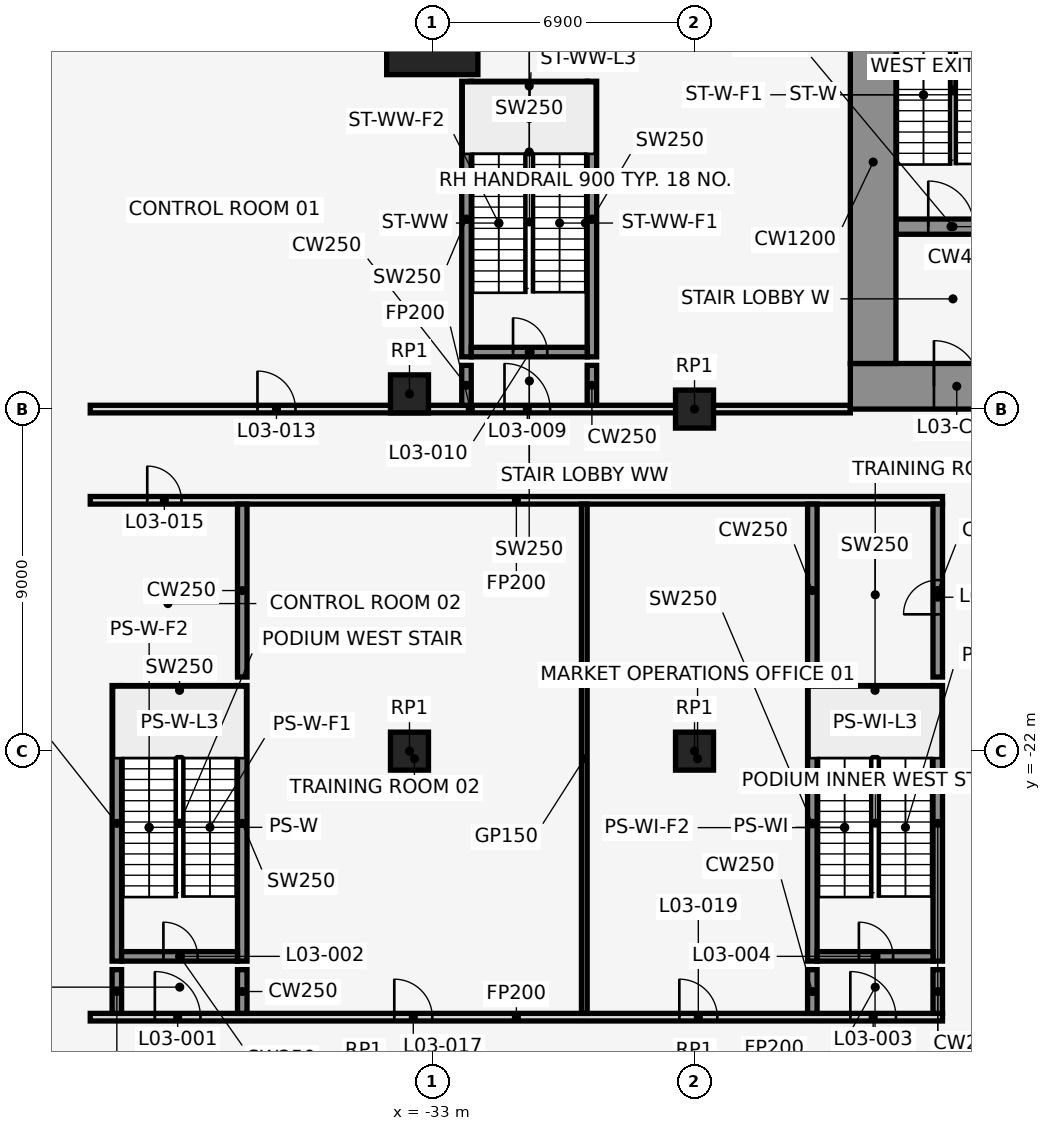
"""IFC4 building model, lengths in metres.
Left out: names, types, materials, properties, quantities, classifications, styles, units other than length and angle.
Written with IfcOpenShell. Run it as: python <this file> out.ifc"""

import sys

from ifc_helpers import new_model, si_unit, direction, frame, frame_2d, origin, origin_2d, place, context, subcontext, project, spatial, rectangle, extrude, element, fill, save


model = new_model("IFC4")
c1 = context("Model", 3, precision=1e-05, world=origin(), true_north=direction((0.0, 1.0)))
c2 = subcontext(c1, "Body", "Model", "MODEL_VIEW")
j1 = project(units=[si_unit("LENGTHUNIT", "METRE"), si_unit("PLANEANGLEUNIT", "RADIAN")], contexts=[c1])
p1 = place(None, origin())
s1 = spatial("IfcSite", under=j1, at=p1, CompositionType="ELEMENT")
p2 = place(p1, origin())
s2 = spatial("IfcBuilding", under=s1, at=p2, CompositionType="ELEMENT")
p3 = place(p2, frame((0.0, 0.0, 20.0)))
s3 = spatial("IfcBuildingStorey", under=s2, at=p3, CompositionType="ELEMENT", Elevation=20.0)
p4 = place(p3, frame((-33.0, -3.0, 0.0), z_axis=(0.0, 0.0, 1.0), x_axis=(1.0, 0.0, 0.0)))
e1 = element("IfcColumn", 1, at=p4, inside=s3, PredefinedType="COLUMN", context=c2, shape_type="SweptSolid", body=[
    extrude(rectangle(XDim=2.4, YDim=2.4, at=origin_2d()), origin(), (0.0, 0.0, 1.0), 5.0),
])
for number, where, z_axis, x_axis in (
    (2, (-33.6, -12.6, 0.0), (0.0, 0.0, 1.0), (1.0, 0.0, 0.0)),
    (3, (-33.6, -22.0, 0.0), (0.0, 0.0, 1.0), (1.0, 0.0, 0.0)),
    (4, (-26.1, -22.0, 0.0), (0.0, 0.0, 1.0), (1.0, 0.0, 0.0)),
    (5, (-26.1, -13.0, 0.0), (0.0, 0.0, 1.0), (1.0, 0.0, 0.0)),
):
    element("IfcColumn", number, at=place(p3, frame(where, z_axis=z_axis, x_axis=x_axis)), inside=s3, PredefinedType="COLUMN", context=c2, shape_type="SweptSolid", body=[
        extrude(rectangle(XDim=1.0, YDim=1.0, at=origin_2d()), origin(), (0.0, 0.0, 1.0), 5.0),
    ])
for number, where, z_axis, x_axis in (
    (6, (-32.1, -11.625, 0.0), (0.0, 0.0, 1.0), (0.0, 1.0, 0.0)),
    (7, (-28.8, -11.625, 0.0), (0.0, 0.0, 1.0), (0.0, 1.0, 0.0)),
):
    element("IfcWall", number, at=place(p3, frame(where, z_axis=z_axis, x_axis=x_axis)), inside=s3, PredefinedType="SHEAR", context=c2, shape_type="SweptSolid", body=[
        extrude(rectangle(XDim=7.25, YDim=0.25, at=frame_2d((3.625, 0.0))), origin(), (0.0, 0.0, 1.0), 5.0),
    ])
p5 = place(p3, frame((-31.975, -11.5, 0.0), z_axis=(0.0, 0.0, 1.0), x_axis=(1.0, 0.0, 0.0)))
e8 = element("IfcWall", 8, at=p5, inside=s3, PredefinedType="SHEAR", context=c2, shape_type="SweptSolid", body=[
    extrude(rectangle(XDim=3.05, YDim=0.25, at=frame_2d((1.525, 0.0))), origin(), (0.0, 0.0, 1.0), 5.0),
])
p6 = place(p5, frame((1.1, 0.0, 0.0)))
e9 = element("IfcOpeningElement", 9, at=p6, cuts=e8, PredefinedType="OPENING", context=c2, shape_type="SweptSolid", body=[
    extrude(rectangle(XDim=0.9, YDim=2.1, at=frame_2d((0.45, 1.05))), frame((0.0, 0.137, 0.0), z_axis=(0.0, -1.0, 0.0), x_axis=(1.0, 0.0, 0.0)), (0.0, 0.0, 1.0), 0.274),
])
p7 = place(p3, frame((-31.975, -4.5, 0.0), z_axis=(0.0, 0.0, 1.0), x_axis=(1.0, 0.0, 0.0)))
e10 = element("IfcWall", 10, at=p7, inside=s3, PredefinedType="SHEAR", context=c2, shape_type="SweptSolid", body=[
    extrude(rectangle(XDim=3.05, YDim=0.25, at=frame_2d((1.525, 0.0))), origin(), (0.0, 0.0, 1.0), 5.0),
])
for number, where, z_axis, x_axis in (
    (11, (-41.3, -27.525, 0.0), (0.0, 0.0, 1.0), (0.0, 1.0, 0.0)),
    (12, (-38.0, -27.525, 0.0), (0.0, 0.0, 1.0), (0.0, 1.0, 0.0)),
):
    element("IfcWall", number, at=place(p3, frame(where, z_axis=z_axis, x_axis=x_axis)), inside=s3, PredefinedType="SHEAR", context=c2, shape_type="SweptSolid", body=[
        extrude(rectangle(XDim=7.25, YDim=0.25, at=frame_2d((3.625, 0.0))), origin(), (0.0, 0.0, 1.0), 5.0),
    ])
p8 = place(p3, frame((-41.175, -27.4, 0.0), z_axis=(0.0, 0.0, 1.0), x_axis=(1.0, 0.0, 0.0)))
e13 = element("IfcWall", 13, at=p8, inside=s3, PredefinedType="SHEAR", context=c2, shape_type="SweptSolid", body=[
    extrude(rectangle(XDim=3.05, YDim=0.25, at=frame_2d((1.525, 0.0))), origin(), (0.0, 0.0, 1.0), 5.0),
])
p9 = place(p8, frame((1.1, 0.0, 0.0)))
e14 = element("IfcOpeningElement", 14, at=p9, cuts=e13, PredefinedType="OPENING", context=c2, shape_type="SweptSolid", body=[
    extrude(rectangle(XDim=0.9, YDim=2.1, at=frame_2d((0.45, 1.05))), frame((0.0, 0.137, 0.0), z_axis=(0.0, -1.0, 0.0), x_axis=(1.0, 0.0, 0.0)), (0.0, 0.0, 1.0), 0.274),
])
p10 = place(p3, frame((-41.175, -20.4, 0.0), z_axis=(0.0, 0.0, 1.0), x_axis=(1.0, 0.0, 0.0)))
e15 = element("IfcWall", 15, at=p10, inside=s3, PredefinedType="SHEAR", context=c2, shape_type="SweptSolid", body=[
    extrude(rectangle(XDim=3.05, YDim=0.25, at=frame_2d((1.525, 0.0))), origin(), (0.0, 0.0, 1.0), 5.0),
])
for number, where, z_axis, x_axis in (
    (16, (-23.0, -27.525, 0.0), (0.0, 0.0, 1.0), (0.0, 1.0, 0.0)),
    (17, (-19.7, -27.525, 0.0), (0.0, 0.0, 1.0), (0.0, 1.0, 0.0)),
):
    element("IfcWall", number, at=place(p3, frame(where, z_axis=z_axis, x_axis=x_axis)), inside=s3, PredefinedType="SHEAR", context=c2, shape_type="SweptSolid", body=[
        extrude(rectangle(XDim=7.25, YDim=0.25, at=frame_2d((3.625, 0.0))), origin(), (0.0, 0.0, 1.0), 5.0),
    ])
p11 = place(p3, frame((-22.875, -27.4, 0.0), z_axis=(0.0, 0.0, 1.0), x_axis=(1.0, 0.0, 0.0)))
e18 = element("IfcWall", 18, at=p11, inside=s3, PredefinedType="SHEAR", context=c2, shape_type="SweptSolid", body=[
    extrude(rectangle(XDim=3.05, YDim=0.25, at=frame_2d((1.525, 0.0))), origin(), (0.0, 0.0, 1.0), 5.0),
])
p12 = place(p11, frame((1.1, 0.0, 0.0)))
e19 = element("IfcOpeningElement", 19, at=p12, cuts=e18, PredefinedType="OPENING", context=c2, shape_type="SweptSolid", body=[
    extrude(rectangle(XDim=0.9, YDim=2.1, at=frame_2d((0.45, 1.05))), frame((0.0, 0.137, 0.0), z_axis=(0.0, -1.0, 0.0), x_axis=(1.0, 0.0, 0.0)), (0.0, 0.0, 1.0), 0.274),
])
p13 = place(p3, frame((-22.875, -20.4, 0.0), z_axis=(0.0, 0.0, 1.0), x_axis=(1.0, 0.0, 0.0)))
e20 = element("IfcWall", 20, at=p13, inside=s3, PredefinedType="SHEAR", context=c2, shape_type="SweptSolid", body=[
    extrude(rectangle(XDim=3.05, YDim=0.25, at=frame_2d((1.525, 0.0))), origin(), (0.0, 0.0, 1.0), 5.0),
])
p14 = place(p3, frame((-42.0, -29.0, 0.0), z_axis=(0.0, 0.0, 1.0), x_axis=(1.0, 0.0, 0.0)))
e21 = element("IfcWall", 21, at=p14, inside=s3, PredefinedType="PARTITIONING", context=c2, shape_type="SweptSolid", body=[
    extrude(rectangle(XDim=22.425, YDim=0.2, at=frame_2d((11.212, 0.0))), origin(), (0.0, 0.0, 1.0), 4.7),
])
p15 = place(p14, frame((1.7, 0.0, 0.0)))
e22 = element("IfcOpeningElement", 22, at=p15, cuts=e21, PredefinedType="OPENING", context=c2, shape_type="SweptSolid", body=[
    extrude(rectangle(XDim=1.2, YDim=2.1, at=frame_2d((0.6, 1.05))), frame((0.0, 0.112, 0.0), z_axis=(0.0, -1.0, 0.0), x_axis=(1.0, 0.0, 0.0)), (0.0, 0.0, 1.0), 0.224),
])
p16 = place(p14, frame((20.0, 0.0, 0.0)))
e23 = element("IfcOpeningElement", 23, at=p16, cuts=e21, PredefinedType="OPENING", context=c2, shape_type="SweptSolid", body=[
    extrude(rectangle(XDim=1.2, YDim=2.1, at=frame_2d((0.6, 1.05))), frame((0.0, 0.112, 0.0), z_axis=(0.0, -1.0, 0.0), x_axis=(1.0, 0.0, 0.0)), (0.0, 0.0, 1.0), 0.224),
])
p17 = place(p14, frame((8.0, 0.0, 0.0)))
e24 = element("IfcOpeningElement", 24, at=p17, cuts=e21, PredefinedType="OPENING", context=c2, shape_type="SweptSolid", body=[
    extrude(rectangle(XDim=1.0, YDim=2.1, at=frame_2d((0.5, 1.05))), frame((0.0, 0.112, 0.0), z_axis=(0.0, -1.0, 0.0), x_axis=(1.0, 0.0, 0.0)), (0.0, 0.0, 1.0), 0.224),
])
p18 = place(p14, frame((15.5, 0.0, 0.0)))
e25 = element("IfcOpeningElement", 25, at=p18, cuts=e21, PredefinedType="OPENING", context=c2, shape_type="SweptSolid", body=[
    extrude(rectangle(XDim=1.0, YDim=2.1, at=frame_2d((0.5, 1.05))), frame((0.0, 0.112, 0.0), z_axis=(0.0, -1.0, 0.0), x_axis=(1.0, 0.0, 0.0)), (0.0, 0.0, 1.0), 0.224),
])
p19 = place(p3, frame((-42.0, -15.4, 0.0), z_axis=(0.0, 0.0, 1.0), x_axis=(1.0, 0.0, 0.0)))
e26 = element("IfcWall", 26, at=p19, inside=s3, PredefinedType="PARTITIONING", context=c2, shape_type="SweptSolid", body=[
    extrude(rectangle(XDim=22.425, YDim=0.2, at=frame_2d((11.212, 0.0))), origin(), (0.0, 0.0, 1.0), 4.7),
])
p20 = place(p19, frame((1.5, 0.0, 0.0)))
e27 = element("IfcOpeningElement", 27, at=p20, cuts=e26, PredefinedType="OPENING", context=c2, shape_type="SweptSolid", body=[
    extrude(rectangle(XDim=0.9, YDim=2.1, at=frame_2d((0.45, 1.05))), frame((0.0, 0.112, 0.0), z_axis=(0.0, -1.0, 0.0), x_axis=(1.0, 0.0, 0.0)), (0.0, 0.0, 1.0), 0.224),
])
p21 = place(p3, frame((-42.0, -13.0, 0.0), z_axis=(0.0, 0.0, 1.0), x_axis=(1.0, 0.0, 0.0)))
e28 = element("IfcWall", 28, at=p21, inside=s3, PredefinedType="PARTITIONING", context=c2, shape_type="SweptSolid", body=[
    extrude(rectangle(XDim=20.0, YDim=0.2, at=frame_2d((10.0, 0.0))), origin(), (0.0, 0.0, 1.0), 4.7),
])
p22 = place(p21, frame((10.9, 0.0, 0.0)))
e29 = element("IfcOpeningElement", 29, at=p22, cuts=e28, PredefinedType="OPENING", context=c2, shape_type="SweptSolid", body=[
    extrude(rectangle(XDim=1.2, YDim=2.1, at=frame_2d((0.6, 1.05))), frame((0.0, 0.112, 0.0), z_axis=(0.0, -1.0, 0.0), x_axis=(1.0, 0.0, 0.0)), (0.0, 0.0, 1.0), 0.224),
])
p23 = place(p21, frame((4.4, 0.0, 0.0)))
e30 = element("IfcOpeningElement", 30, at=p23, cuts=e28, PredefinedType="OPENING", context=c2, shape_type="SweptSolid", body=[
    extrude(rectangle(XDim=1.0, YDim=2.1, at=frame_2d((0.5, 1.05))), frame((0.0, 0.112, 0.0), z_axis=(0.0, -1.0, 0.0), x_axis=(1.0, 0.0, 0.0)), (0.0, 0.0, 1.0), 0.224),
])
for number, where, z_axis, x_axis in (
    (31, (-41.3, -28.9, 0.0), (0.0, 0.0, 1.0), (0.0, 1.0, 0.0)),
    (32, (-38.0, -28.9, 0.0), (0.0, 0.0, 1.0), (0.0, 1.0, 0.0)),
):
    element("IfcWall", number, at=place(p3, frame(where, z_axis=z_axis, x_axis=x_axis)), inside=s3, PredefinedType="SHEAR", context=c2, shape_type="SweptSolid", body=[
        extrude(rectangle(XDim=1.15, YDim=0.25, at=frame_2d((0.575, 0.0))), origin(), (0.0, 0.0, 1.0), 5.0),
    ])
p24 = place(p3, frame((-38.0, -20.05, 0.0), z_axis=(0.0, 0.0, 1.0), x_axis=(0.0, 1.0, 0.0)))
e33 = element("IfcWall", 33, at=p24, inside=s3, PredefinedType="SHEAR", context=c2, shape_type="SweptSolid", body=[
    extrude(rectangle(XDim=4.55, YDim=0.25, at=frame_2d((2.275, 0.0))), origin(), (0.0, 0.0, 1.0), 5.0),
])
p25 = place(p3, frame((-32.1, -12.9, 0.0), z_axis=(0.0, 0.0, 1.0), x_axis=(0.0, 1.0, 0.0)))
e34 = element("IfcWall", 34, at=p25, inside=s3, PredefinedType="SHEAR", context=c2, shape_type="SweptSolid", body=[
    extrude(rectangle(XDim=1.05, YDim=0.25, at=frame_2d((0.525, 0.0))), origin(), (0.0, 0.0, 1.0), 5.0),
])
p26 = place(p3, frame((-29.0, -28.9, 0.0), z_axis=(0.0, 0.0, 1.0), x_axis=(0.0, 1.0, 0.0)))
e35 = element("IfcWall", 35, at=p26, inside=s3, PredefinedType="PARTITIONING", context=c2, shape_type="SweptSolid", body=[
    extrude(rectangle(XDim=13.4, YDim=0.15, at=frame_2d((6.7, 0.0))), origin(), (0.0, 0.0, 1.0), 4.7),
])
p27 = place(p3, frame((-28.8, -12.9, 0.0), z_axis=(0.0, 0.0, 1.0), x_axis=(0.0, 1.0, 0.0)))
e36 = element("IfcWall", 36, at=p27, inside=s3, PredefinedType="SHEAR", context=c2, shape_type="SweptSolid", body=[
    extrude(rectangle(XDim=1.05, YDim=0.25, at=frame_2d((0.525, 0.0))), origin(), (0.0, 0.0, 1.0), 5.0),
])
p28 = place(p3, frame((-23.0, -28.9, 0.0), z_axis=(0.0, 0.0, 1.0), x_axis=(0.0, 1.0, 0.0)))
e37 = element("IfcWall", 37, at=p28, inside=s3, PredefinedType="SHEAR", context=c2, shape_type="SweptSolid", body=[
    extrude(rectangle(XDim=1.15, YDim=0.25, at=frame_2d((0.575, 0.0))), origin(), (0.0, 0.0, 1.0), 5.0),
])
p29 = place(p3, frame((-23.0, -20.05, 0.0), z_axis=(0.0, 0.0, 1.0), x_axis=(0.0, 1.0, 0.0)))
e38 = element("IfcWall", 38, at=p29, inside=s3, PredefinedType="SHEAR", context=c2, shape_type="SweptSolid", body=[
    extrude(rectangle(XDim=4.55, YDim=0.25, at=frame_2d((2.275, 0.0))), origin(), (0.0, 0.0, 1.0), 5.0),
])
p30 = place(p3, frame((-19.7, -28.9, 0.0), z_axis=(0.0, 0.0, 1.0), x_axis=(0.0, 1.0, 0.0)))
e39 = element("IfcWall", 39, at=p30, inside=s3, PredefinedType="SHEAR", context=c2, shape_type="SweptSolid", body=[
    extrude(rectangle(XDim=1.15, YDim=0.25, at=frame_2d((0.575, 0.0))), origin(), (0.0, 0.0, 1.0), 5.0),
])
p31 = place(p3, frame((-19.7, -20.05, 0.0), z_axis=(0.0, 0.0, 1.0), x_axis=(0.0, 1.0, 0.0)))
e40 = element("IfcWall", 40, at=p31, inside=s3, PredefinedType="SHEAR", context=c2, shape_type="SweptSolid", body=[
    extrude(rectangle(XDim=4.55, YDim=0.25, at=frame_2d((2.275, 0.0))), origin(), (0.0, 0.0, 1.0), 5.0),
])
p32 = place(p31, frame((1.65, 0.0, 0.0)))
e41 = element("IfcOpeningElement", 41, at=p32, cuts=e40, PredefinedType="OPENING", context=c2, shape_type="SweptSolid", body=[
    extrude(rectangle(XDim=0.9, YDim=2.1, at=frame_2d((0.45, 1.05))), frame((0.0, 0.137, 0.0), z_axis=(0.0, -1.0, 0.0), x_axis=(1.0, 0.0, 0.0)), (0.0, 0.0, 1.0), 0.274),
])
p33 = place(p3, frame((-20.8, -8.2, 0.0), z_axis=(0.0, 0.0, 1.0), x_axis=(1.0, 0.0, 0.0)))
e42 = element("IfcWall", 42, at=p33, inside=s3, PredefinedType="SHEAR", context=c2, shape_type="SweptSolid", body=[
    extrude(rectangle(XDim=3.0, YDim=0.4, at=frame_2d((1.5, 0.0))), origin(), (0.0, 0.0, 1.0), 5.0),
])
p34 = place(p33, frame((0.85, 0.0, 0.0)))
e43 = element("IfcOpeningElement", 43, at=p34, cuts=e42, PredefinedType="OPENING", context=c2, shape_type="SweptSolid", body=[
    extrude(rectangle(XDim=1.2, YDim=2.1, at=frame_2d((0.6, 1.05))), frame((0.0, 0.212, 0.0), z_axis=(0.0, -1.0, 0.0), x_axis=(1.0, 0.0, 0.0)), (0.0, 0.0, 1.0), 0.424),
])
p35 = place(p3, frame((-22.0, -12.4, 0.0), z_axis=(0.0, 0.0, 1.0), x_axis=(1.0, 0.0, 0.0)))
e44 = element("IfcWall", 44, at=p35, inside=s3, PredefinedType="SHEAR", context=c2, shape_type="SweptSolid", body=[
    extrude(rectangle(XDim=44.0, YDim=1.2, at=frame_2d((22.0, 0.0))), origin(), (0.0, 0.0, 1.0), 5.0),
])
p36 = place(p35, frame((2.2, 0.0, 0.0)))
e45 = element("IfcOpeningElement", 45, at=p36, cuts=e44, PredefinedType="OPENING", context=c2, shape_type="SweptSolid", body=[
    extrude(rectangle(XDim=1.2, YDim=2.1, at=frame_2d((0.6, 1.05))), frame((0.0, 0.612, 0.0), z_axis=(0.0, -1.0, 0.0), x_axis=(1.0, 0.0, 0.0)), (0.0, 0.0, 1.0), 1.224),
])
p37 = place(p35, frame((21.4, 0.0, 0.0)))
e46 = element("IfcOpeningElement", 46, at=p37, cuts=e44, PredefinedType="OPENING", context=c2, shape_type="SweptSolid", body=[
    extrude(rectangle(XDim=1.2, YDim=2.1, at=frame_2d((0.6, 1.05))), frame((0.0, 0.612, 0.0), z_axis=(0.0, -1.0, 0.0), x_axis=(1.0, 0.0, 0.0)), (0.0, 0.0, 1.0), 1.224),
])
p38 = place(p35, frame((40.6, 0.0, 0.0)))
e47 = element("IfcOpeningElement", 47, at=p38, cuts=e44, PredefinedType="OPENING", context=c2, shape_type="SweptSolid", body=[
    extrude(rectangle(XDim=1.2, YDim=2.1, at=frame_2d((0.6, 1.05))), frame((0.0, 0.612, 0.0), z_axis=(0.0, -1.0, 0.0), x_axis=(1.0, 0.0, 0.0)), (0.0, 0.0, 1.0), 1.224),
])
p39 = place(p35, frame((16.0, 0.0, 0.0)))
e48 = element("IfcOpeningElement", 48, at=p39, cuts=e44, PredefinedType="OPENING", context=c2, shape_type="SweptSolid", body=[
    extrude(rectangle(XDim=1.8, YDim=2.1, at=frame_2d((0.9, 1.05))), frame((0.0, 0.612, 0.0), z_axis=(0.0, -1.0, 0.0), x_axis=(1.0, 0.0, 0.0)), (0.0, 0.0, 1.0), 1.224),
])
p40 = place(p35, frame((6.3, 0.0, 0.0)))
e49 = element("IfcOpeningElement", 49, at=p40, cuts=e44, PredefinedType="OPENING", context=c2, shape_type="SweptSolid", body=[
    extrude(rectangle(XDim=1.2, YDim=2.1, at=frame_2d((0.6, 1.05))), frame((0.0, 0.612, 0.0), z_axis=(0.0, -1.0, 0.0), x_axis=(1.0, 0.0, 0.0)), (0.0, 0.0, 1.0), 1.224),
])
p41 = place(p35, frame((26.2, 0.0, 0.0)))
e50 = element("IfcOpeningElement", 50, at=p41, cuts=e44, PredefinedType="OPENING", context=c2, shape_type="SweptSolid", body=[
    extrude(rectangle(XDim=1.8, YDim=2.1, at=frame_2d((0.9, 1.05))), frame((0.0, 0.612, 0.0), z_axis=(0.0, -1.0, 0.0), x_axis=(1.0, 0.0, 0.0)), (0.0, 0.0, 1.0), 1.224),
])
p42 = place(p35, frame((36.5, 0.0, 0.0)))
e51 = element("IfcOpeningElement", 51, at=p42, cuts=e44, PredefinedType="OPENING", context=c2, shape_type="SweptSolid", body=[
    extrude(rectangle(XDim=1.2, YDim=2.1, at=frame_2d((0.6, 1.05))), frame((0.0, 0.612, 0.0), z_axis=(0.0, -1.0, 0.0), x_axis=(1.0, 0.0, 0.0)), (0.0, 0.0, 1.0), 1.224),
])
p43 = place(p3, frame((-21.4, -11.8, 0.0), z_axis=(0.0, 0.0, 1.0), x_axis=(0.0, 1.0, 0.0)))
e52 = element("IfcWall", 52, at=p43, inside=s3, PredefinedType="SHEAR", context=c2, shape_type="SweptSolid", body=[
    extrude(rectangle(XDim=10.6, YDim=1.2, at=frame_2d((5.3, 0.0))), origin(), (0.0, 0.0, 1.0), 5.0),
])
p44 = place(p15, origin())
e53 = element("IfcDoor", 53, at=p44, inside=s3, OperationType="SINGLE_SWING_LEFT", PredefinedType="DOOR", context=c2, shape_type="SweptSolid", body=[
    extrude(rectangle(XDim=1.2, YDim=2.1, at=frame_2d((0.6, 1.05))), frame((0.0, 0.025, 0.0), z_axis=(0.0, -1.0, 0.0), x_axis=(1.0, 0.0, 0.0)), (0.0, 0.0, 1.0), 0.05),
])
fill(e22, e53)
p45 = place(p9, origin())
e54 = element("IfcDoor", 54, at=p45, inside=s3, OperationType="SINGLE_SWING_LEFT", PredefinedType="DOOR", context=c2, shape_type="SweptSolid", body=[
    extrude(rectangle(XDim=0.9, YDim=2.1, at=frame_2d((0.45, 1.05))), frame((0.0, 0.025, 0.0), z_axis=(0.0, -1.0, 0.0), x_axis=(1.0, 0.0, 0.0)), (0.0, 0.0, 1.0), 0.05),
])
fill(e14, e54)
p46 = place(p16, origin())
e55 = element("IfcDoor", 55, at=p46, inside=s3, OperationType="SINGLE_SWING_RIGHT", PredefinedType="DOOR", context=c2, shape_type="SweptSolid", body=[
    extrude(rectangle(XDim=1.2, YDim=2.1, at=frame_2d((0.6, 1.05))), frame((0.0, 0.025, 0.0), z_axis=(0.0, -1.0, 0.0), x_axis=(1.0, 0.0, 0.0)), (0.0, 0.0, 1.0), 0.05),
])
fill(e23, e55)
p47 = place(p12, origin())
e56 = element("IfcDoor", 56, at=p47, inside=s3, OperationType="SINGLE_SWING_LEFT", PredefinedType="DOOR", context=c2, shape_type="SweptSolid", body=[
    extrude(rectangle(XDim=0.9, YDim=2.1, at=frame_2d((0.45, 1.05))), frame((0.0, 0.025, 0.0), z_axis=(0.0, -1.0, 0.0), x_axis=(1.0, 0.0, 0.0)), (0.0, 0.0, 1.0), 0.05),
])
fill(e19, e56)
p48 = place(p22, origin())
e57 = element("IfcDoor", 57, at=p48, inside=s3, OperationType="SINGLE_SWING_RIGHT", PredefinedType="DOOR", context=c2, shape_type="SweptSolid", body=[
    extrude(rectangle(XDim=1.2, YDim=2.1, at=frame_2d((0.6, 1.05))), frame((0.0, 0.025, 0.0), z_axis=(0.0, -1.0, 0.0), x_axis=(1.0, 0.0, 0.0)), (0.0, 0.0, 1.0), 0.05),
])
fill(e29, e57)
p49 = place(p6, origin())
e58 = element("IfcDoor", 58, at=p49, inside=s3, OperationType="SINGLE_SWING_LEFT", PredefinedType="DOOR", context=c2, shape_type="SweptSolid", body=[
    extrude(rectangle(XDim=0.9, YDim=2.1, at=frame_2d((0.45, 1.05))), frame((0.0, 0.025, 0.0), z_axis=(0.0, -1.0, 0.0), x_axis=(1.0, 0.0, 0.0)), (0.0, 0.0, 1.0), 0.05),
])
fill(e9, e58)
p50 = place(p23, origin())
e59 = element("IfcDoor", 59, at=p50, inside=s3, OperationType="SINGLE_SWING_LEFT", PredefinedType="DOOR", context=c2, shape_type="SweptSolid", body=[
    extrude(rectangle(XDim=1.0, YDim=2.1, at=frame_2d((0.5, 1.05))), frame((0.0, 0.025, 0.0), z_axis=(0.0, -1.0, 0.0), x_axis=(1.0, 0.0, 0.0)), (0.0, 0.0, 1.0), 0.05),
])
fill(e30, e59)
p51 = place(p20, frame((0.9, 0.0, 0.0), z_axis=(0.0, 0.0, 1.0), x_axis=(-1.0, 0.0, 0.0)))
e60 = element("IfcDoor", 60, at=p51, inside=s3, OperationType="SINGLE_SWING_RIGHT", PredefinedType="DOOR", context=c2, shape_type="SweptSolid", body=[
    extrude(rectangle(XDim=0.9, YDim=2.1, at=frame_2d((0.45, 1.05))), frame((0.0, 0.025, 0.0), z_axis=(0.0, -1.0, 0.0), x_axis=(1.0, 0.0, 0.0)), (0.0, 0.0, 1.0), 0.05),
])
fill(e27, e60)
p52 = place(p17, origin())
e61 = element("IfcDoor", 61, at=p52, inside=s3, OperationType="SINGLE_SWING_LEFT", PredefinedType="DOOR", context=c2, shape_type="SweptSolid", body=[
    extrude(rectangle(XDim=1.0, YDim=2.1, at=frame_2d((0.5, 1.05))), frame((0.0, 0.025, 0.0), z_axis=(0.0, -1.0, 0.0), x_axis=(1.0, 0.0, 0.0)), (0.0, 0.0, 1.0), 0.05),
])
fill(e24, e61)
p53 = place(p18, origin())
e62 = element("IfcDoor", 62, at=p53, inside=s3, OperationType="SINGLE_SWING_LEFT", PredefinedType="DOOR", context=c2, shape_type="SweptSolid", body=[
    extrude(rectangle(XDim=1.0, YDim=2.1, at=frame_2d((0.5, 1.05))), frame((0.0, 0.025, 0.0), z_axis=(0.0, -1.0, 0.0), x_axis=(1.0, 0.0, 0.0)), (0.0, 0.0, 1.0), 0.05),
])
fill(e25, e62)
p54 = place(p32, origin())
e63 = element("IfcDoor", 63, at=p54, inside=s3, OperationType="SINGLE_SWING_RIGHT", PredefinedType="DOOR", context=c2, shape_type="SweptSolid", body=[
    extrude(rectangle(XDim=0.9, YDim=2.1, at=frame_2d((0.45, 1.05))), frame((0.0, 0.025, 0.0), z_axis=(0.0, -1.0, 0.0), x_axis=(1.0, 0.0, 0.0)), (0.0, 0.0, 1.0), 0.05),
])
fill(e41, e63)
p55 = place(p34, origin())
e64 = element("IfcDoor", 64, at=p55, inside=s3, OperationType="SINGLE_SWING_LEFT", PredefinedType="DOOR", context=c2, shape_type="SweptSolid", body=[
    extrude(rectangle(XDim=1.2, YDim=2.1, at=frame_2d((0.6, 1.05))), frame((0.0, 0.025, 0.0), z_axis=(0.0, -1.0, 0.0), x_axis=(1.0, 0.0, 0.0)), (0.0, 0.0, 1.0), 0.05),
])
fill(e43, e64)
p56 = place(p36, frame((1.2, 0.0, 0.0), z_axis=(0.0, 0.0, 1.0), x_axis=(-1.0, 0.0, 0.0)))
e65 = element("IfcDoor", 65, at=p56, inside=s3, OperationType="SINGLE_SWING_RIGHT", PredefinedType="DOOR", context=c2, shape_type="SweptSolid", body=[
    extrude(rectangle(XDim=1.2, YDim=2.1, at=frame_2d((0.6, 1.05))), frame((0.0, 0.025, 0.0), z_axis=(0.0, -1.0, 0.0), x_axis=(1.0, 0.0, 0.0)), (0.0, 0.0, 1.0), 0.05),
])
fill(e45, e65)
save(model, sys.argv[1])
